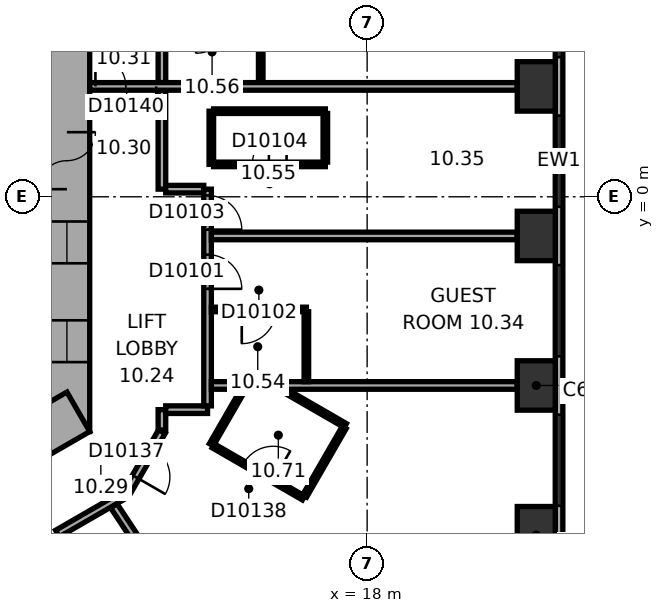
"""IFC4 building model, lengths in metres.
Left out: names, types, materials, properties, quantities, classifications, styles, units other than length and angle.
Written with IfcOpenShell. Run it as: python <this file> out.ifc"""

import sys

from ifc_helpers import new_model, si_unit, direction, frame, frame_2d, origin, origin_2d, place, context, subcontext, project, spatial, rectangle, extrude, element, fill, save


model = new_model("IFC4")
c1 = context("Model", 3, precision=1e-05, world=origin(), true_north=direction((0.0, 1.0)))
c2 = subcontext(c1, "Body", "Model", "MODEL_VIEW")
j1 = project(units=[si_unit("LENGTHUNIT", "METRE"), si_unit("PLANEANGLEUNIT", "RADIAN")], contexts=[c1])
p1 = place(None, origin())
s1 = spatial("IfcSite", under=j1, at=p1, CompositionType="ELEMENT")
p2 = place(p1, origin())
s2 = spatial("IfcBuilding", under=s1, at=p2, CompositionType="ELEMENT")
p3 = place(p2, frame((0.0, 0.0, 53.9)))
s3 = spatial("IfcBuildingStorey", under=s2, at=p3, CompositionType="ELEMENT", Elevation=53.9)
p4 = place(p3, frame((22.45, -8.899, 0.0), z_axis=(0.0, 0.0, 1.0), x_axis=(0.0, 1.0, 0.0)))
e1 = element("IfcColumn", 1, at=p4, inside=s3, PredefinedType="COLUMN", context=c2, shape_type="SweptSolid", body=[
    extrude(rectangle(XDim=1.5, YDim=1.0, at=origin_2d()), origin(), (0.0, 0.0, 1.0), 3.3),
])
for number, where, z_axis, x_axis in (
    (2, (22.45, -4.965, 0.0), (0.0, 0.0, 1.0), (0.0, 1.0, 0.0)),
    (3, (22.45, -1.03, 0.0), (0.0, 0.0, 1.0), (0.0, 1.0, 0.0)),
    (4, (22.45, 2.905, 0.0), (0.0, 0.0, 1.0), (0.0, 1.0, 0.0)),
):
    element("IfcColumn", number, at=place(p3, frame(where, z_axis=z_axis, x_axis=x_axis)), inside=s3, PredefinedType="COLUMN", context=c2, shape_type="SweptSolid", body=[
        extrude(rectangle(XDim=1.3, YDim=1.0, at=origin_2d()), origin(), (0.0, 0.0, 1.0), 3.3),
    ])
p5 = place(p3, frame((10.1, -6.177, 0.0), z_axis=(0.0, 0.0, 1.0), x_axis=(0.0, 1.0, 0.0)))
e5 = element("IfcWall", 5, at=p5, inside=s3, PredefinedType="SHEAR", context=c2, shape_type="SweptSolid", body=[
    extrude(rectangle(XDim=12.355, YDim=1.2, at=frame_2d((6.177, 0.0))), origin(), (0.0, 0.0, 1.0), 3.3),
])
p6 = place(p5, frame((6.378, 0.0, 0.0)))
e6 = element("IfcOpeningElement", 6, at=p6, cuts=e5, PredefinedType="OPENING", context=c2, shape_type="SweptSolid", body=[
    extrude(rectangle(XDim=1.5, YDim=2.1, at=frame_2d((0.75, 1.05))), frame((0.0, 0.61, 0.0), z_axis=(0.0, -1.0, 0.0), x_axis=(1.0, 0.0, 0.0)), (0.0, 0.0, 1.0), 1.22),
])
p7 = place(p5, frame((1.828, 0.0, 0.0)))
e7 = element("IfcOpeningElement", 7, at=p7, cuts=e5, PredefinedType="OPENING", context=c2, shape_type="SweptSolid", body=[
    extrude(rectangle(XDim=1.1, YDim=2.1, at=frame_2d((0.55, 1.05))), frame((0.0, 0.61, 0.0), z_axis=(0.0, -1.0, 0.0), x_axis=(1.0, 0.0, 0.0)), (0.0, 0.0, 1.0), 1.22),
])
p8 = place(p5, frame((4.427, 0.0, 0.0)))
e8 = element("IfcOpeningElement", 8, at=p8, cuts=e5, PredefinedType="OPENING", context=c2, shape_type="SweptSolid", body=[
    extrude(rectangle(XDim=1.1, YDim=2.1, at=frame_2d((0.55, 1.05))), frame((0.0, 0.61, 0.0), z_axis=(0.0, -1.0, 0.0), x_axis=(1.0, 0.0, 0.0)), (0.0, 0.0, 1.0), 1.22),
])
p9 = place(p3, frame((-0.3, -11.836, 0.0), z_axis=(0.0, 0.0, 1.0), x_axis=(0.866021384402, 0.500006961711, 0.0)))
e9 = element("IfcWall", 9, at=p9, inside=s3, PredefinedType="SHEAR", context=c2, shape_type="SweptSolid", body=[
    extrude(rectangle(XDim=12.355, YDim=1.2, at=frame_2d((6.178, 0.0))), origin(), (0.0, 0.0, 1.0), 3.3),
])
p10 = place(p9, frame((4.128, 0.0, 0.0)))
e10 = element("IfcOpeningElement", 10, at=p10, cuts=e9, PredefinedType="OPENING", context=c2, shape_type="SweptSolid", body=[
    extrude(rectangle(XDim=0.9, YDim=2.1, at=frame_2d((0.45, 1.05))), frame((0.0, 0.61, 0.0), z_axis=(0.0, -1.0, 0.0), x_axis=(1.0, 0.0, 0.0)), (0.0, 0.0, 1.0), 1.22),
])
p11 = place(p9, frame((7.928, 0.0, 0.0)))
e11 = element("IfcOpeningElement", 11, at=p11, cuts=e9, PredefinedType="OPENING", context=c2, shape_type="SweptSolid", body=[
    extrude(rectangle(XDim=1.1, YDim=2.1, at=frame_2d((0.55, 1.05))), frame((0.0, 0.61, 0.0), z_axis=(0.0, -1.0, 0.0), x_axis=(1.0, 0.0, 0.0)), (0.0, 0.0, 1.0), 1.22),
])
p12 = place(p3, frame((23.05, -9.687, 0.0), z_axis=(0.0, 0.0, 1.0), x_axis=(0.0, 1.0, 0.0)))
e12 = element("IfcWall", 12, at=p12, inside=s3, PredefinedType="STANDARD", context=c2, shape_type="SweptSolid", body=[
    extrude(rectangle(XDim=21.246, YDim=0.2, at=frame_2d((10.623, 0.0))), origin(), (0.0, 0.0, 1.0), 3.3),
])
p13 = place(p12, frame((1.555, 0.0, 0.8)))
e13 = element("IfcOpeningElement", 13, at=p13, cuts=e12, PredefinedType="OPENING", context=c2, shape_type="SweptSolid", body=[
    extrude(rectangle(XDim=2.4, YDim=1.7, at=frame_2d((1.2, 0.85))), frame((0.0, 0.11, 0.0), z_axis=(0.0, -1.0, 0.0), x_axis=(1.0, 0.0, 0.0)), (0.0, 0.0, 1.0), 0.22),
])
p14 = place(p12, frame((5.489, 0.0, 0.8)))
e14 = element("IfcOpeningElement", 14, at=p14, cuts=e12, PredefinedType="OPENING", context=c2, shape_type="SweptSolid", body=[
    extrude(rectangle(XDim=2.4, YDim=1.7, at=frame_2d((1.2, 0.85))), frame((0.0, 0.11, 0.0), z_axis=(0.0, -1.0, 0.0), x_axis=(1.0, 0.0, 0.0)), (0.0, 0.0, 1.0), 0.22),
])
p15 = place(p12, frame((9.424, 0.0, 0.8)))
e15 = element("IfcOpeningElement", 15, at=p15, cuts=e12, PredefinedType="OPENING", context=c2, shape_type="SweptSolid", body=[
    extrude(rectangle(XDim=2.4, YDim=1.7, at=frame_2d((1.2, 0.85))), frame((0.0, 0.11, 0.0), z_axis=(0.0, -1.0, 0.0), x_axis=(1.0, 0.0, 0.0)), (0.0, 0.0, 1.0), 0.22),
])
p16 = place(p12, frame((13.358, 0.0, 0.8)))
e16 = element("IfcOpeningElement", 16, at=p16, cuts=e12, PredefinedType="OPENING", context=c2, shape_type="SweptSolid", body=[
    extrude(rectangle(XDim=2.4, YDim=1.7, at=frame_2d((1.2, 0.85))), frame((0.0, 0.11, 0.0), z_axis=(0.0, -1.0, 0.0), x_axis=(1.0, 0.0, 0.0)), (0.0, 0.0, 1.0), 0.22),
])
p17 = place(p12, frame((17.293, 0.0, 0.8)))
e17 = element("IfcOpeningElement", 17, at=p17, cuts=e12, PredefinedType="OPENING", context=c2, shape_type="SweptSolid", body=[
    extrude(rectangle(XDim=2.4, YDim=1.7, at=frame_2d((1.2, 0.85))), frame((0.0, 0.11, 0.0), z_axis=(0.0, -1.0, 0.0), x_axis=(1.0, 0.0, 0.0)), (0.0, 0.0, 1.0), 0.22),
])
p18 = place(p3, frame((9.852, -8.861, 0.0), z_axis=(0.0, 0.0, 1.0), x_axis=(0.866013291437, 0.500020978615, 0.0)))
e18 = element("IfcWall", 18, at=p18, inside=s3, PredefinedType="PARTITIONING", context=c2, shape_type="SweptSolid", body=[
    extrude(rectangle(XDim=2.077, YDim=0.2, at=frame_2d((1.038, 0.0))), origin(), (0.0, 0.0, 1.0), 3.05),
])
p19 = place(p3, frame((11.67, -7.788, 0.0), z_axis=(0.0, 0.0, 1.0), x_axis=(0.500063286585, 0.865988862174, 0.0)))
e19 = element("IfcWall", 19, at=p19, inside=s3, PredefinedType="PARTITIONING", context=c2, shape_type="SweptSolid", body=[
    extrude(rectangle(XDim=1.86, YDim=0.2, at=frame_2d((0.93, 0.0))), origin(), (0.0, 0.0, 1.0), 3.05),
])
p20 = place(p19, frame((0.48, 0.0, 0.0)))
e20 = element("IfcOpeningElement", 20, at=p20, cuts=e19, PredefinedType="OPENING", context=c2, shape_type="SweptSolid", body=[
    extrude(rectangle(XDim=0.9, YDim=2.1, at=frame_2d((0.45, 1.05))), frame((0.0, 0.11, 0.0), z_axis=(0.0, -1.0, 0.0), x_axis=(1.0, 0.0, 0.0)), (0.0, 0.0, 1.0), 0.22),
])
p21 = place(p3, frame((12.6, -6.138, 0.0), z_axis=(0.0, 0.0, 1.0), x_axis=(0.0, 1.0, 0.0)))
e21 = element("IfcWall", 21, at=p21, inside=s3, PredefinedType="PARTITIONING", context=c2, shape_type="SweptSolid", body=[
    extrude(rectangle(XDim=0.537, YDim=0.2, at=frame_2d((0.268, 0.0))), origin(), (0.0, 0.0, 1.0), 3.05),
])
p22 = place(p3, frame((12.6, 0.201, 0.0), z_axis=(0.0, 0.0, 1.0), x_axis=(0.0, 1.0, 0.0)))
e22 = element("IfcWall", 22, at=p22, inside=s3, PredefinedType="PARTITIONING", context=c2, shape_type="SweptSolid", body=[
    extrude(rectangle(XDim=2.604, YDim=0.2, at=frame_2d((1.302, 0.0))), origin(), (0.0, 0.0, 1.0), 3.05),
])
p23 = place(p3, frame((12.6, 3.004, 0.0), z_axis=(0.0, 0.0, 1.0), x_axis=(0.0, 1.0, 0.0)))
e23 = element("IfcWall", 23, at=p23, inside=s3, PredefinedType="PARTITIONING", context=c2, shape_type="SweptSolid", body=[
    extrude(rectangle(XDim=3.173, YDim=0.2, at=frame_2d((1.586, 0.0))), origin(), (0.0, 0.0, 1.0), 3.05),
])
p24 = place(p23, frame((1.998, 0.0, 0.0)))
e24 = element("IfcOpeningElement", 24, at=p24, cuts=e23, PredefinedType="OPENING", context=c2, shape_type="SweptSolid", body=[
    extrude(rectangle(XDim=0.9, YDim=2.1, at=frame_2d((0.45, 1.05))), frame((0.0, 0.11, 0.0), z_axis=(0.0, -1.0, 0.0), x_axis=(1.0, 0.0, 0.0)), (0.0, 0.0, 1.0), 0.22),
])
p25 = place(p3, frame((12.7, -5.601, 0.0), z_axis=(0.0, 0.0, 1.0), x_axis=(1.0, 0.0, 0.0)))
e25 = element("IfcWall", 25, at=p25, inside=s3, PredefinedType="PARTITIONING", context=c2, shape_type="SweptSolid", body=[
    extrude(rectangle(XDim=1.101, YDim=0.2, at=frame_2d((0.551, 0.0))), origin(), (0.0, 0.0, 1.0), 3.05),
])
p26 = place(p3, frame((13.701, 0.201, 0.0), z_axis=(0.0, 0.0, 1.0), x_axis=(-1.0, 0.0, 0.0)))
e26 = element("IfcWall", 26, at=p26, inside=s3, PredefinedType="PARTITIONING", context=c2, shape_type="SweptSolid", body=[
    extrude(rectangle(XDim=1.001, YDim=0.2, at=frame_2d((0.5, 0.0))), origin(), (0.0, 0.0, 1.0), 3.05),
])
p27 = place(p3, frame((13.801, -5.501, 0.0), z_axis=(0.0, 0.0, 1.0), x_axis=(0.0, 1.0, 0.0)))
e27 = element("IfcWall", 27, at=p27, inside=s3, PredefinedType="PARTITIONING", context=c2, shape_type="SweptSolid", body=[
    extrude(rectangle(XDim=5.702, YDim=0.2, at=frame_2d((2.851, 0.0))), origin(), (0.0, 0.0, 1.0), 3.05),
])
p28 = place(p27, frame((3.079, 0.0, 0.0)))
e28 = element("IfcOpeningElement", 28, at=p28, cuts=e27, PredefinedType="OPENING", context=c2, shape_type="SweptSolid", body=[
    extrude(rectangle(XDim=0.9, YDim=2.1, at=frame_2d((0.45, 1.05))), frame((0.0, 0.11, 0.0), z_axis=(0.0, -1.0, 0.0), x_axis=(1.0, 0.0, 0.0)), (0.0, 0.0, 1.0), 0.22),
])
p29 = place(p27, frame((4.636, 0.0, 0.0)))
e29 = element("IfcOpeningElement", 29, at=p29, cuts=e27, PredefinedType="OPENING", context=c2, shape_type="SweptSolid", body=[
    extrude(rectangle(XDim=0.9, YDim=2.1, at=frame_2d((0.45, 1.05))), frame((0.0, 0.11, 0.0), z_axis=(0.0, -1.0, 0.0), x_axis=(1.0, 0.0, 0.0)), (0.0, 0.0, 1.0), 0.22),
])
p30 = place(p3, frame((13.901, -6.524, 0.0), z_axis=(0.0, 0.0, 1.0), x_axis=(0.499964162598, 0.86604609353, 0.0)))
e30 = element("IfcWall", 30, at=p30, inside=s3, PredefinedType="PARTITIONING", context=c2, shape_type="SweptSolid", body=[
    extrude(rectangle(XDim=1.661, YDim=0.12, at=frame_2d((0.831, 0.0))), origin(), (0.0, 0.0, 1.0), 3.05),
])
p31 = place(p3, frame((13.901, -4.965, 0.0), z_axis=(0.0, 0.0, 1.0), x_axis=(1.0, 0.0, 0.0)))
e31 = element("IfcWall", 31, at=p31, inside=s3, PredefinedType="PARTITIONING", context=c2, shape_type="SweptSolid", body=[
    extrude(rectangle(XDim=8.049, YDim=0.2, at=frame_2d((4.024, 0.0))), origin(), (0.0, 0.0, 1.0), 3.05),
])
p32 = place(p3, frame((13.901, -2.965, 0.0), z_axis=(0.0, 0.0, 1.0), x_axis=(1.0, 0.0, 0.0)))
e32 = element("IfcWall", 32, at=p32, inside=s3, PredefinedType="PARTITIONING", context=c2, shape_type="SweptSolid", body=[
    extrude(rectangle(XDim=2.5, YDim=0.12, at=frame_2d((1.25, 0.0))), origin(), (0.0, 0.0, 1.0), 3.05),
])
p33 = place(p32, frame((0.8, 0.0, 0.0)))
e33 = element("IfcOpeningElement", 33, at=p33, cuts=e32, PredefinedType="OPENING", context=c2, shape_type="SweptSolid", body=[
    extrude(rectangle(XDim=0.9, YDim=2.1, at=frame_2d((0.45, 1.05))), frame((0.0, 0.07, 0.0), z_axis=(0.0, -1.0, 0.0), x_axis=(1.0, 0.0, 0.0)), (0.0, 0.0, 1.0), 0.14),
])
p34 = place(p3, frame((13.9, 0.853, 0.0), z_axis=(0.0, 0.0, 1.0), x_axis=(0.0, 1.0, 0.0)))
e34 = element("IfcWall", 34, at=p34, inside=s3, PredefinedType="PARTITIONING", context=c2, shape_type="SweptSolid", body=[
    extrude(rectangle(XDim=1.4, YDim=0.12, at=frame_2d((0.7, 0.0))), origin(), (0.0, 0.0, 1.0), 3.05),
])
p35 = place(p3, frame((13.96, 2.253, 0.0), z_axis=(0.0, 0.0, 1.0), x_axis=(1.0, 0.0, 0.0)))
e35 = element("IfcWall", 35, at=p35, inside=s3, PredefinedType="PARTITIONING", context=c2, shape_type="SweptSolid", body=[
    extrude(rectangle(XDim=2.94, YDim=0.12, at=frame_2d((1.47, 0.0))), origin(), (0.0, 0.0, 1.0), 3.05),
])
p36 = place(p3, frame((15.2, 4.618, 0.0), z_axis=(0.0, 0.0, 1.0), x_axis=(0.0, -1.0, 0.0)))
e36 = element("IfcWall", 36, at=p36, inside=s3, PredefinedType="PARTITIONING", context=c2, shape_type="SweptSolid", body=[
    extrude(rectangle(XDim=1.613, YDim=0.12, at=frame_2d((0.807, 0.0))), origin(), (0.0, 0.0, 1.0), 3.05),
])
p37 = place(p3, frame((15.841, -5.104, 0.0), z_axis=(0.0, 0.0, 1.0), x_axis=(0.866025591402, -0.499999675036, 0.0)))
e37 = element("IfcWall", 37, at=p37, inside=s3, PredefinedType="PARTITIONING", context=c2, shape_type="SweptSolid", body=[
    extrude(rectangle(XDim=1.83, YDim=0.12, at=frame_2d((0.915, 0.0))), origin(), (0.0, 0.0, 1.0), 3.05),
])
p38 = place(p3, frame((16.255, -15.564, 0.0), z_axis=(0.0, 0.0, 1.0), x_axis=(-0.55192208744, 0.833895682562, 0.0)))
e38 = element("IfcWall", 38, at=p38, inside=s3, PredefinedType="PARTITIONING", context=c2, shape_type="SweptSolid", body=[
    extrude(rectangle(XDim=8.913, YDim=0.2, at=frame_2d((4.457, 0.0))), origin(), (0.0, 0.0, 1.0), 2.6),
])
p39 = place(p3, frame((16.326, -7.925, 0.0), z_axis=(0.0, 0.0, 1.0), x_axis=(-0.865997131366, 0.500048966069, 0.0)))
e39 = element("IfcWall", 39, at=p39, inside=s3, PredefinedType="PARTITIONING", context=c2, shape_type="SweptSolid", body=[
    extrude(rectangle(XDim=2.74, YDim=0.12, at=frame_2d((1.37, 0.0))), origin(), (0.0, 0.0, 1.0), 3.05),
])
p40 = place(p39, frame((0.92, 0.0, 0.0)))
e40 = element("IfcOpeningElement", 40, at=p40, cuts=e39, PredefinedType="OPENING", context=c2, shape_type="SweptSolid", body=[
    extrude(rectangle(XDim=0.9, YDim=2.1, at=frame_2d((0.45, 1.05))), frame((0.0, 0.07, 0.0), z_axis=(0.0, -1.0, 0.0), x_axis=(1.0, 0.0, 0.0)), (0.0, 0.0, 1.0), 0.14),
])
p41 = place(p3, frame((16.401, -3.025, 0.0), z_axis=(0.0, 0.0, 1.0), x_axis=(0.0, -1.0, 0.0)))
e41 = element("IfcWall", 41, at=p41, inside=s3, PredefinedType="PARTITIONING", context=c2, shape_type="SweptSolid", body=[
    extrude(rectangle(XDim=1.84, YDim=0.12, at=frame_2d((0.92, 0.0))), origin(), (0.0, 0.0, 1.0), 3.05),
])
p42 = place(p3, frame((16.9, 0.853, 0.0), z_axis=(0.0, 0.0, 1.0), x_axis=(-1.0, 0.0, 0.0)))
e42 = element("IfcWall", 42, at=p42, inside=s3, PredefinedType="PARTITIONING", context=c2, shape_type="SweptSolid", body=[
    extrude(rectangle(XDim=2.94, YDim=0.12, at=frame_2d((1.47, 0.0))), origin(), (0.0, 0.0, 1.0), 3.05),
])
p43 = place(p42, frame((1.02, 0.0, 0.0)))
e43 = element("IfcOpeningElement", 43, at=p43, cuts=e42, PredefinedType="OPENING", context=c2, shape_type="SweptSolid", body=[
    extrude(rectangle(XDim=0.9, YDim=2.1, at=frame_2d((0.45, 1.05))), frame((0.0, 0.07, 0.0), z_axis=(0.0, -1.0, 0.0), x_axis=(1.0, 0.0, 0.0)), (0.0, 0.0, 1.0), 0.14),
])
p44 = place(p3, frame((16.9, 2.193, 0.0), z_axis=(0.0, 0.0, 1.0), x_axis=(0.0, -1.0, 0.0)))
e44 = element("IfcWall", 44, at=p44, inside=s3, PredefinedType="PARTITIONING", context=c2, shape_type="SweptSolid", body=[
    extrude(rectangle(XDim=1.28, YDim=0.12, at=frame_2d((0.64, 0.0))), origin(), (0.0, 0.0, 1.0), 3.05),
])
p45 = place(p3, frame((17.396, -6.071, 0.0), z_axis=(0.0, 0.0, 1.0), x_axis=(-0.500027264788, -0.866009661879, 0.0)))
e45 = element("IfcWall", 45, at=p45, inside=s3, PredefinedType="PARTITIONING", context=c2, shape_type="SweptSolid", body=[
    extrude(rectangle(XDim=2.08, YDim=0.12, at=frame_2d((1.04, 0.0))), origin(), (0.0, 0.0, 1.0), 3.05),
])
p46 = place(p3, frame((21.95, -1.03, 0.0), z_axis=(0.0, 0.0, 1.0), x_axis=(-1.0, 0.0, 0.0)))
e46 = element("IfcWall", 46, at=p46, inside=s3, PredefinedType="PARTITIONING", context=c2, shape_type="SweptSolid", body=[
    extrude(rectangle(XDim=8.049, YDim=0.2, at=frame_2d((4.024, 0.0))), origin(), (0.0, 0.0, 1.0), 2.6),
])
p47 = place(p3, frame((21.95, 2.905, 0.0), z_axis=(0.0, 0.0, 1.0), x_axis=(-1.0, 0.0, 0.0)))
e47 = element("IfcWall", 47, at=p47, inside=s3, PredefinedType="PARTITIONING", context=c2, shape_type="SweptSolid", body=[
    extrude(rectangle(XDim=11.25, YDim=0.2, at=frame_2d((5.625, 0.0))), origin(), (0.0, 0.0, 1.0), 3.05),
])
p48 = place(p47, frame((9.5, 0.0, 0.0)))
e48 = element("IfcOpeningElement", 48, at=p48, cuts=e47, PredefinedType="OPENING", context=c2, shape_type="SweptSolid", body=[
    extrude(rectangle(XDim=1.6, YDim=2.1, at=frame_2d((0.8, 1.05))), frame((0.0, 0.11, 0.0), z_axis=(0.0, -1.0, 0.0), x_axis=(1.0, 0.0, 0.0)), (0.0, 0.0, 1.0), 0.22),
])
p49 = place(p13, origin())
e49 = element("IfcWindow", 49, at=p49, inside=s3, PartitioningType="SINGLE_PANEL", PredefinedType="WINDOW", context=c2, shape_type="SweptSolid", body=[
    extrude(rectangle(XDim=2.4, YDim=1.7, at=frame_2d((1.2, 0.85))), frame((0.0, 0.03, 0.0), z_axis=(0.0, -1.0, 0.0), x_axis=(1.0, 0.0, 0.0)), (0.0, 0.0, 1.0), 0.06),
])
fill(e13, e49)
p50 = place(p14, origin())
e50 = element("IfcWindow", 50, at=p50, inside=s3, PartitioningType="SINGLE_PANEL", PredefinedType="WINDOW", context=c2, shape_type="SweptSolid", body=[
    extrude(rectangle(XDim=2.4, YDim=1.7, at=frame_2d((1.2, 0.85))), frame((0.0, 0.03, 0.0), z_axis=(0.0, -1.0, 0.0), x_axis=(1.0, 0.0, 0.0)), (0.0, 0.0, 1.0), 0.06),
])
fill(e14, e50)
p51 = place(p15, origin())
e51 = element("IfcWindow", 51, at=p51, inside=s3, PartitioningType="SINGLE_PANEL", PredefinedType="WINDOW", context=c2, shape_type="SweptSolid", body=[
    extrude(rectangle(XDim=2.4, YDim=1.7, at=frame_2d((1.2, 0.85))), frame((0.0, 0.03, 0.0), z_axis=(0.0, -1.0, 0.0), x_axis=(1.0, 0.0, 0.0)), (0.0, 0.0, 1.0), 0.06),
])
fill(e15, e51)
p52 = place(p16, origin())
e52 = element("IfcWindow", 52, at=p52, inside=s3, PartitioningType="SINGLE_PANEL", PredefinedType="WINDOW", context=c2, shape_type="SweptSolid", body=[
    extrude(rectangle(XDim=2.4, YDim=1.7, at=frame_2d((1.2, 0.85))), frame((0.0, 0.03, 0.0), z_axis=(0.0, -1.0, 0.0), x_axis=(1.0, 0.0, 0.0)), (0.0, 0.0, 1.0), 0.06),
])
fill(e16, e52)
p53 = place(p6, origin())
e53 = element("IfcDoor", 53, at=p53, inside=s3, OperationType="DOUBLE_DOOR_SINGLE_SWING", PredefinedType="DOOR", context=c2, shape_type="SweptSolid", body=[
    extrude(rectangle(XDim=1.5, YDim=2.1, at=frame_2d((0.75, 1.05))), frame((0.0, 0.025, 0.0), z_axis=(0.0, -1.0, 0.0), x_axis=(1.0, 0.0, 0.0)), (0.0, 0.0, 1.0), 0.05),
])
fill(e6, e53)
p54 = place(p7, origin())
e54 = element("IfcDoor", 54, at=p54, inside=s3, OperationType="DOUBLE_DOOR_SLIDING", PredefinedType="DOOR", context=c2, shape_type="SweptSolid", body=[
    extrude(rectangle(XDim=1.1, YDim=2.1, at=frame_2d((0.55, 1.05))), frame((0.0, 0.025, 0.0), z_axis=(0.0, -1.0, 0.0), x_axis=(1.0, 0.0, 0.0)), (0.0, 0.0, 1.0), 0.05),
])
fill(e7, e54)
p55 = place(p8, origin())
e55 = element("IfcDoor", 55, at=p55, inside=s3, OperationType="DOUBLE_DOOR_SLIDING", PredefinedType="DOOR", context=c2, shape_type="SweptSolid", body=[
    extrude(rectangle(XDim=1.1, YDim=2.1, at=frame_2d((0.55, 1.05))), frame((0.0, 0.025, 0.0), z_axis=(0.0, -1.0, 0.0), x_axis=(1.0, 0.0, 0.0)), (0.0, 0.0, 1.0), 0.05),
])
fill(e8, e55)
p56 = place(p28, origin())
e56 = element("IfcDoor", 56, at=p56, inside=s3, OperationType="SINGLE_SWING_LEFT", PredefinedType="DOOR", context=c2, shape_type="SweptSolid", body=[
    extrude(rectangle(XDim=0.9, YDim=2.1, at=frame_2d((0.45, 1.05))), frame((0.0, 0.025, 0.0), z_axis=(0.0, -1.0, 0.0), x_axis=(1.0, 0.0, 0.0)), (0.0, 0.0, 1.0), 0.05),
])
fill(e28, e56)
p57 = place(p33, origin())
e57 = element("IfcDoor", 57, at=p57, inside=s3, OperationType="SINGLE_SWING_LEFT", PredefinedType="DOOR", context=c2, shape_type="SweptSolid", body=[
    extrude(rectangle(XDim=0.9, YDim=2.1, at=frame_2d((0.45, 1.05))), frame((0.0, 0.025, 0.0), z_axis=(0.0, -1.0, 0.0), x_axis=(1.0, 0.0, 0.0)), (0.0, 0.0, 1.0), 0.05),
])
fill(e33, e57)
p58 = place(p29, origin())
e58 = element("IfcDoor", 58, at=p58, inside=s3, OperationType="SINGLE_SWING_LEFT", PredefinedType="DOOR", context=c2, shape_type="SweptSolid", body=[
    extrude(rectangle(XDim=0.9, YDim=2.1, at=frame_2d((0.45, 1.05))), frame((0.0, 0.025, 0.0), z_axis=(0.0, -1.0, 0.0), x_axis=(1.0, 0.0, 0.0)), (0.0, 0.0, 1.0), 0.05),
])
fill(e29, e58)
p59 = place(p43, origin())
e59 = element("IfcDoor", 59, at=p59, inside=s3, OperationType="SINGLE_SWING_LEFT", PredefinedType="DOOR", context=c2, shape_type="SweptSolid", body=[
    extrude(rectangle(XDim=0.9, YDim=2.1, at=frame_2d((0.45, 1.05))), frame((0.0, 0.025, 0.0), z_axis=(0.0, -1.0, 0.0), x_axis=(1.0, 0.0, 0.0)), (0.0, 0.0, 1.0), 0.05),
])
fill(e43, e59)
p60 = place(p20, origin())
e60 = element("IfcDoor", 60, at=p60, inside=s3, OperationType="SINGLE_SWING_LEFT", PredefinedType="DOOR", context=c2, shape_type="SweptSolid", body=[
    extrude(rectangle(XDim=0.9, YDim=2.1, at=frame_2d((0.45, 1.05))), frame((0.0, 0.025, 0.0), z_axis=(0.0, -1.0, 0.0), x_axis=(1.0, 0.0, 0.0)), (0.0, 0.0, 1.0), 0.05),
])
fill(e20, e60)
p61 = place(p40, origin())
e61 = element("IfcDoor", 61, at=p61, inside=s3, OperationType="SINGLE_SWING_LEFT", PredefinedType="DOOR", context=c2, shape_type="SweptSolid", body=[
    extrude(rectangle(XDim=0.9, YDim=2.1, at=frame_2d((0.45, 1.05))), frame((0.0, 0.025, 0.0), z_axis=(0.0, -1.0, 0.0), x_axis=(1.0, 0.0, 0.0)), (0.0, 0.0, 1.0), 0.05),
])
fill(e40, e61)
p62 = place(p48, origin())
e62 = element("IfcDoor", 62, at=p62, inside=s3, OperationType="DOUBLE_DOOR_SINGLE_SWING", PredefinedType="DOOR", context=c2, shape_type="SweptSolid", body=[
    extrude(rectangle(XDim=1.6, YDim=2.1, at=frame_2d((0.8, 1.05))), frame((0.0, 0.025, 0.0), z_axis=(0.0, -1.0, 0.0), x_axis=(1.0, 0.0, 0.0)), (0.0, 0.0, 1.0), 0.05),
])
fill(e48, e62)
save(model, sys.argv[1])
